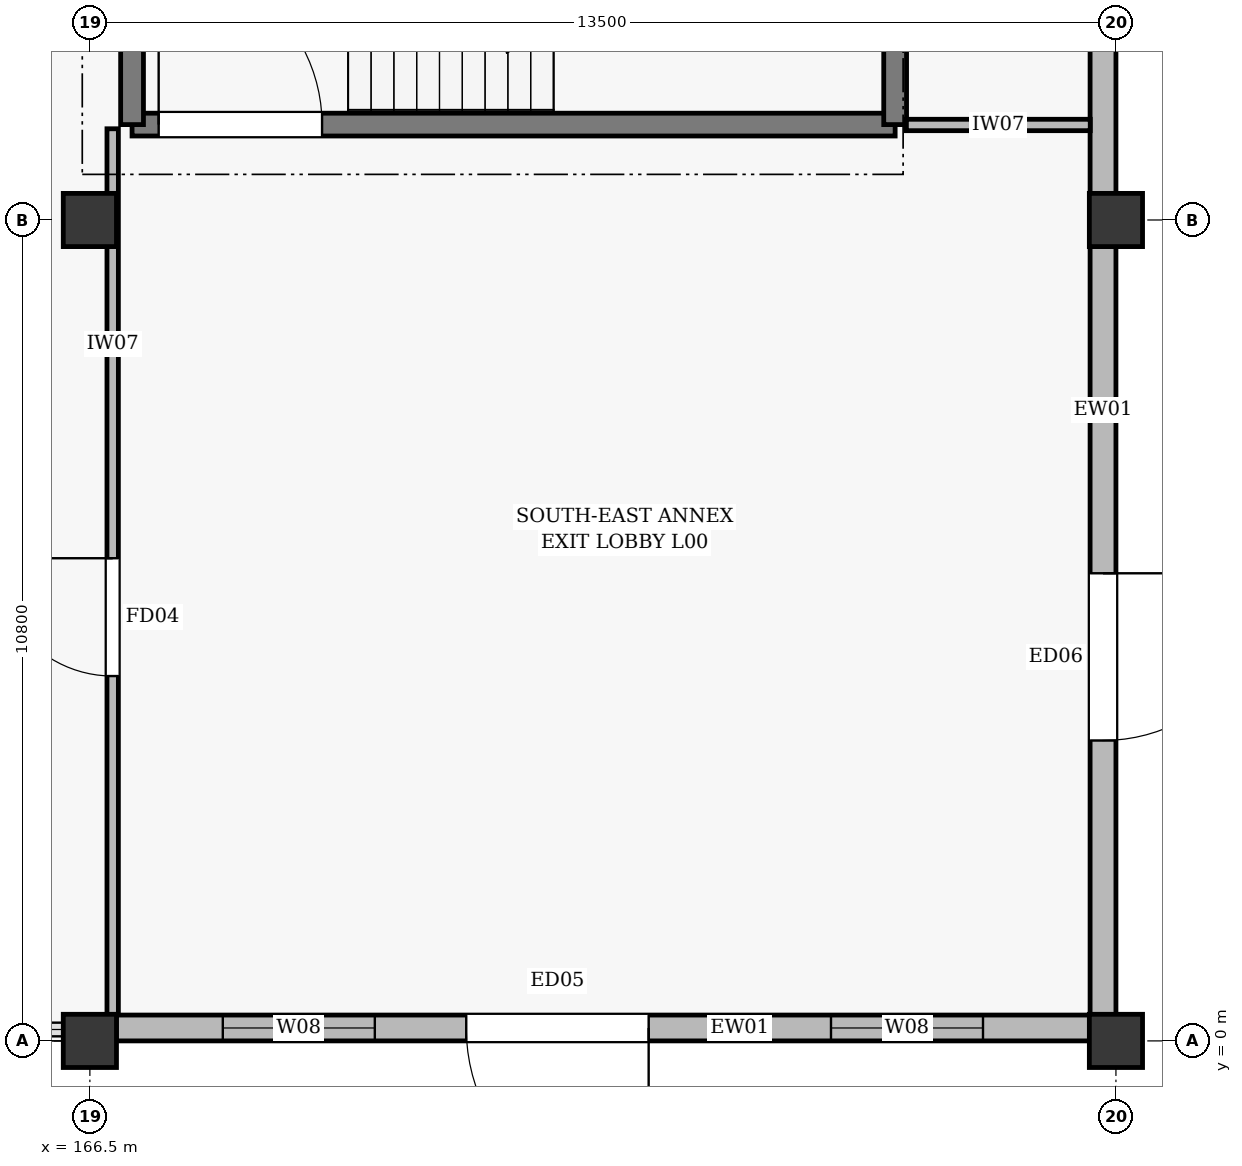
"""IFC4 building model, lengths in metres.
Left out: names, types, materials, properties, quantities, classifications, styles, units other than length and angle.
Written with IfcOpenShell. Run it as: python <this file> out.ifc"""

import sys

from ifc_helpers import new_model, si_unit, direction, frame, frame_2d, origin, origin_2d, place, context, subcontext, project, spatial, rectangle, extrude, element, fill, save


model = new_model("IFC4")
c1 = context("Model", 3, precision=1e-05, world=origin(), true_north=direction((0.0, 1.0)))
c2 = subcontext(c1, "Body", "Model", "MODEL_VIEW")
j1 = project(units=[si_unit("LENGTHUNIT", "METRE"), si_unit("PLANEANGLEUNIT", "RADIAN")], contexts=[c1])
p1 = place(None, origin())
s1 = spatial("IfcSite", under=j1, at=p1, CompositionType="ELEMENT")
p2 = place(p1, origin())
s2 = spatial("IfcBuilding", under=s1, at=p2, CompositionType="ELEMENT")
p3 = place(p2, origin())
s3 = spatial("IfcBuildingStorey", under=s2, at=p3, CompositionType="ELEMENT", Elevation=0.0)
for number, where, z_axis, x_axis in (
    (1, (166.5, 0.0, 0.0), (0.0, 0.0, 1.0), (1.0, 0.0, 0.0)),
    (2, (166.5, 10.8, 0.0), (0.0, 0.0, 1.0), (1.0, 0.0, 0.0)),
    (3, (180.0, 0.0, 0.0), (0.0, 0.0, 1.0), (1.0, 0.0, 0.0)),
    (4, (180.0, 10.8, 0.0), (0.0, 0.0, 1.0), (1.0, 0.0, 0.0)),
):
    element("IfcColumn", number, at=place(p3, frame(where, z_axis=z_axis, x_axis=x_axis)), inside=s3, PredefinedType="COLUMN", context=c2, shape_type="SweptSolid", body=[
        extrude(rectangle(XDim=0.7, YDim=0.7, at=origin_2d()), origin(), (0.0, 0.0, 1.0), 6.6),
    ])
p4 = place(p3, frame((179.652, 0.17, 0.0), z_axis=(0.0, 0.0, 1.0), x_axis=(-1.0, 0.0, 0.0)))
e5 = element("IfcWall", 5, at=p4, inside=s3, PredefinedType="STANDARD", context=c2, shape_type="SweptSolid", body=[
    extrude(rectangle(XDim=12.804, YDim=0.34, at=frame_2d((6.402, 0.0))), origin(), (0.0, 0.0, 1.0), 5.75),
])
p5 = place(p4, frame((5.8, 0.0, 0.005)))
e6 = element("IfcOpeningElement", 6, at=p5, cuts=e5, PredefinedType="OPENING", context=c2, shape_type="SweptSolid", body=[
    extrude(rectangle(XDim=2.4, YDim=2.5, at=frame_2d((1.2, 1.25))), frame((0.0, 0.182, 0.0), z_axis=(0.0, -1.0, 0.0), x_axis=(1.0, 0.0, 0.0)), (0.0, 0.0, 1.0), 0.364),
])
p6 = place(p4, frame((1.401, 0.0, 0.75)))
e7 = element("IfcOpeningElement", 7, at=p6, cuts=e5, PredefinedType="OPENING", context=c2, shape_type="SweptSolid", body=[
    extrude(rectangle(XDim=2.0, YDim=2.2, at=frame_2d((1.0, 1.1))), frame((0.0, 0.182, 0.0), z_axis=(0.0, -1.0, 0.0), x_axis=(1.0, 0.0, 0.0)), (0.0, 0.0, 1.0), 0.364),
])
p7 = place(p4, frame((9.403, 0.0, 0.75)))
e8 = element("IfcOpeningElement", 8, at=p7, cuts=e5, PredefinedType="OPENING", context=c2, shape_type="SweptSolid", body=[
    extrude(rectangle(XDim=2.0, YDim=2.2, at=frame_2d((1.0, 1.1))), frame((0.0, 0.182, 0.0), z_axis=(0.0, -1.0, 0.0), x_axis=(1.0, 0.0, 0.0)), (0.0, 0.0, 1.0), 0.364),
])
p8 = place(p3, frame((179.83, 10.452, 0.0), z_axis=(0.0, 0.0, 1.0), x_axis=(0.0, -1.0, 0.0)))
e9 = element("IfcWall", 9, at=p8, inside=s3, PredefinedType="STANDARD", context=c2, shape_type="SweptSolid", body=[
    extrude(rectangle(XDim=10.104, YDim=0.34, at=frame_2d((5.052, 0.0))), origin(), (0.0, 0.0, 1.0), 5.75),
])
p9 = place(p8, frame((4.3, 0.0, 0.005)))
e10 = element("IfcOpeningElement", 10, at=p9, cuts=e9, PredefinedType="OPENING", context=c2, shape_type="SweptSolid", body=[
    extrude(rectangle(XDim=2.2, YDim=2.45, at=frame_2d((1.1, 1.225))), frame((0.0, 0.182, 0.0), z_axis=(0.0, -1.0, 0.0), x_axis=(1.0, 0.0, 0.0)), (0.0, 0.0, 1.0), 0.364),
])
p10 = place(p3, frame((179.83, 21.252, 0.0), z_axis=(0.0, 0.0, 1.0), x_axis=(0.0, -1.0, 0.0)))
e11 = element("IfcWall", 11, at=p10, inside=s3, PredefinedType="STANDARD", context=c2, shape_type="SweptSolid", body=[
    extrude(rectangle(XDim=10.104, YDim=0.34, at=frame_2d((5.052, 0.0))), origin(), (0.0, 0.0, 1.0), 5.69),
])
p11 = place(p10, frame((1.226, 0.0, 0.75)))
e12 = element("IfcOpeningElement", 12, at=p11, cuts=e11, PredefinedType="OPENING", context=c2, shape_type="SweptSolid", body=[
    extrude(rectangle(XDim=3.0, YDim=2.6, at=frame_2d((1.5, 1.3))), frame((0.0, 0.182, 0.0), z_axis=(0.0, -1.0, 0.0), x_axis=(1.0, 0.0, 0.0)), (0.0, 0.0, 1.0), 0.364),
])
p12 = place(p10, frame((6.878, 0.0, 1.05)))
e13 = element("IfcOpeningElement", 13, at=p12, cuts=e11, PredefinedType="OPENING", context=c2, shape_type="SweptSolid", body=[
    extrude(rectangle(XDim=1.0, YDim=1.6, at=frame_2d((0.5, 0.8))), frame((0.0, 0.182, 0.0), z_axis=(0.0, -1.0, 0.0), x_axis=(1.0, 0.0, 0.0)), (0.0, 0.0, 1.0), 0.364),
])
p13 = place(p3, frame((167.055, 12.055, 0.0), z_axis=(0.0, 0.0, 1.0), x_axis=(1.0, 0.0, 0.0)))
e14 = element("IfcWall", 14, at=p13, inside=s3, PredefinedType="SOLIDWALL", context=c2, shape_type="SweptSolid", body=[
    extrude(rectangle(XDim=10.04, YDim=0.3, at=frame_2d((5.02, 0.0))), origin(), (0.0, 0.0, 1.0), 6.6),
])
p14 = place(p13, frame((0.35, 0.0, 0.005)))
e15 = element("IfcOpeningElement", 15, at=p14, cuts=e14, PredefinedType="OPENING", context=c2, shape_type="SweptSolid", body=[
    extrude(rectangle(XDim=2.15, YDim=2.2, at=frame_2d((1.075, 1.1))), frame((0.0, 0.162, 0.0), z_axis=(0.0, -1.0, 0.0), x_axis=(1.0, 0.0, 0.0)), (0.0, 0.0, 1.0), 0.324),
])
for number, where, z_axis, x_axis in (
    (16, (167.055, 12.055, 0.0), (0.0, 0.0, 1.0), (0.0, 1.0, 0.0)),
    (17, (177.095, 12.055, 0.0), (0.0, 0.0, 1.0), (0.0, 1.0, 0.0)),
):
    element("IfcWall", number, at=place(p3, frame(where, z_axis=z_axis, x_axis=x_axis)), inside=s3, PredefinedType="SOLIDWALL", context=c2, shape_type="SweptSolid", body=[
        extrude(rectangle(XDim=4.19, YDim=0.3, at=frame_2d((2.095, 0.0))), origin(), (0.0, 0.0, 1.0), 6.6),
    ])
p15 = place(p3, frame((166.8, 0.348, 0.0), z_axis=(0.0, 0.0, 1.0), x_axis=(0.0, 1.0, 0.0)))
e18 = element("IfcWall", 18, at=p15, inside=s3, PredefinedType="PARTITIONING", context=c2, shape_type="SweptSolid", body=[
    extrude(rectangle(XDim=11.652, YDim=0.15, at=frame_2d((5.826, 0.0))), origin(), (0.0, 0.0, 1.0), 5.74),
])
p16 = place(p15, frame((4.452, 0.0, 0.005)))
e19 = element("IfcOpeningElement", 19, at=p16, cuts=e18, PredefinedType="OPENING", context=c2, shape_type="SweptSolid", body=[
    extrude(rectangle(XDim=1.55, YDim=2.2, at=frame_2d((0.775, 1.1))), frame((0.0, 0.087, 0.0), z_axis=(0.0, -1.0, 0.0), x_axis=(1.0, 0.0, 0.0)), (0.0, 0.0, 1.0), 0.174),
])
p17 = place(p3, frame((177.243, 12.05, 0.0), z_axis=(0.0, 0.0, 1.0), x_axis=(1.0, 0.0, 0.0)))
e20 = element("IfcWall", 20, at=p17, inside=s3, PredefinedType="PARTITIONING", context=c2, shape_type="SweptSolid", body=[
    extrude(rectangle(XDim=2.419, YDim=0.15, at=frame_2d((1.209, 0.0))), origin(), (0.0, 0.0, 1.0), 6.0),
])
p18 = place(p5, origin())
e21 = element("IfcDoor", 21, at=p18, inside=s3, OperationType="DOUBLE_DOOR_SINGLE_SWING", PredefinedType="DOOR", context=c2, shape_type="SweptSolid", body=[
    extrude(rectangle(XDim=2.4, YDim=2.5, at=frame_2d((1.2, 1.25))), frame((0.0, 0.025, 0.0), z_axis=(0.0, -1.0, 0.0), x_axis=(1.0, 0.0, 0.0)), (0.0, 0.0, 1.0), 0.05),
])
fill(e6, e21)
p19 = place(p6, origin())
e22 = element("IfcWindow", 22, at=p19, inside=s3, PartitioningType="DOUBLE_PANEL_VERTICAL", PredefinedType="WINDOW", context=c2, shape_type="SweptSolid", body=[
    extrude(rectangle(XDim=2.0, YDim=2.2, at=frame_2d((1.0, 1.1))), frame((0.0, 0.03, 0.0), z_axis=(0.0, -1.0, 0.0), x_axis=(1.0, 0.0, 0.0)), (0.0, 0.0, 1.0), 0.06),
])
fill(e7, e22)
p20 = place(p7, origin())
e23 = element("IfcWindow", 23, at=p20, inside=s3, PartitioningType="DOUBLE_PANEL_VERTICAL", PredefinedType="WINDOW", context=c2, shape_type="SweptSolid", body=[
    extrude(rectangle(XDim=2.0, YDim=2.2, at=frame_2d((1.0, 1.1))), frame((0.0, 0.03, 0.0), z_axis=(0.0, -1.0, 0.0), x_axis=(1.0, 0.0, 0.0)), (0.0, 0.0, 1.0), 0.06),
])
fill(e8, e23)
p21 = place(p9, origin())
e24 = element("IfcDoor", 24, at=p21, inside=s3, OperationType="SINGLE_SWING_LEFT", PredefinedType="DOOR", context=c2, shape_type="SweptSolid", body=[
    extrude(rectangle(XDim=2.2, YDim=2.45, at=frame_2d((1.1, 1.225))), frame((0.0, 0.025, 0.0), z_axis=(0.0, -1.0, 0.0), x_axis=(1.0, 0.0, 0.0)), (0.0, 0.0, 1.0), 0.05),
])
fill(e10, e24)
p22 = place(p14, origin())
e25 = element("IfcDoor", 25, at=p22, inside=s3, OperationType="SINGLE_SWING_LEFT", PredefinedType="DOOR", context=c2, shape_type="SweptSolid", body=[
    extrude(rectangle(XDim=2.15, YDim=2.2, at=frame_2d((1.075, 1.1))), frame((0.0, 0.025, 0.0), z_axis=(0.0, -1.0, 0.0), x_axis=(1.0, 0.0, 0.0)), (0.0, 0.0, 1.0), 0.05),
])
fill(e15, e25)
p23 = place(p16, origin())
e26 = element("IfcDoor", 26, at=p23, inside=s3, OperationType="SINGLE_SWING_RIGHT", PredefinedType="DOOR", context=c2, shape_type="SweptSolid", body=[
    extrude(rectangle(XDim=1.55, YDim=2.2, at=frame_2d((0.775, 1.1))), frame((0.0, 0.025, 0.0), z_axis=(0.0, -1.0, 0.0), x_axis=(1.0, 0.0, 0.0)), (0.0, 0.0, 1.0), 0.05),
])
fill(e19, e26)
save(model, sys.argv[1])
